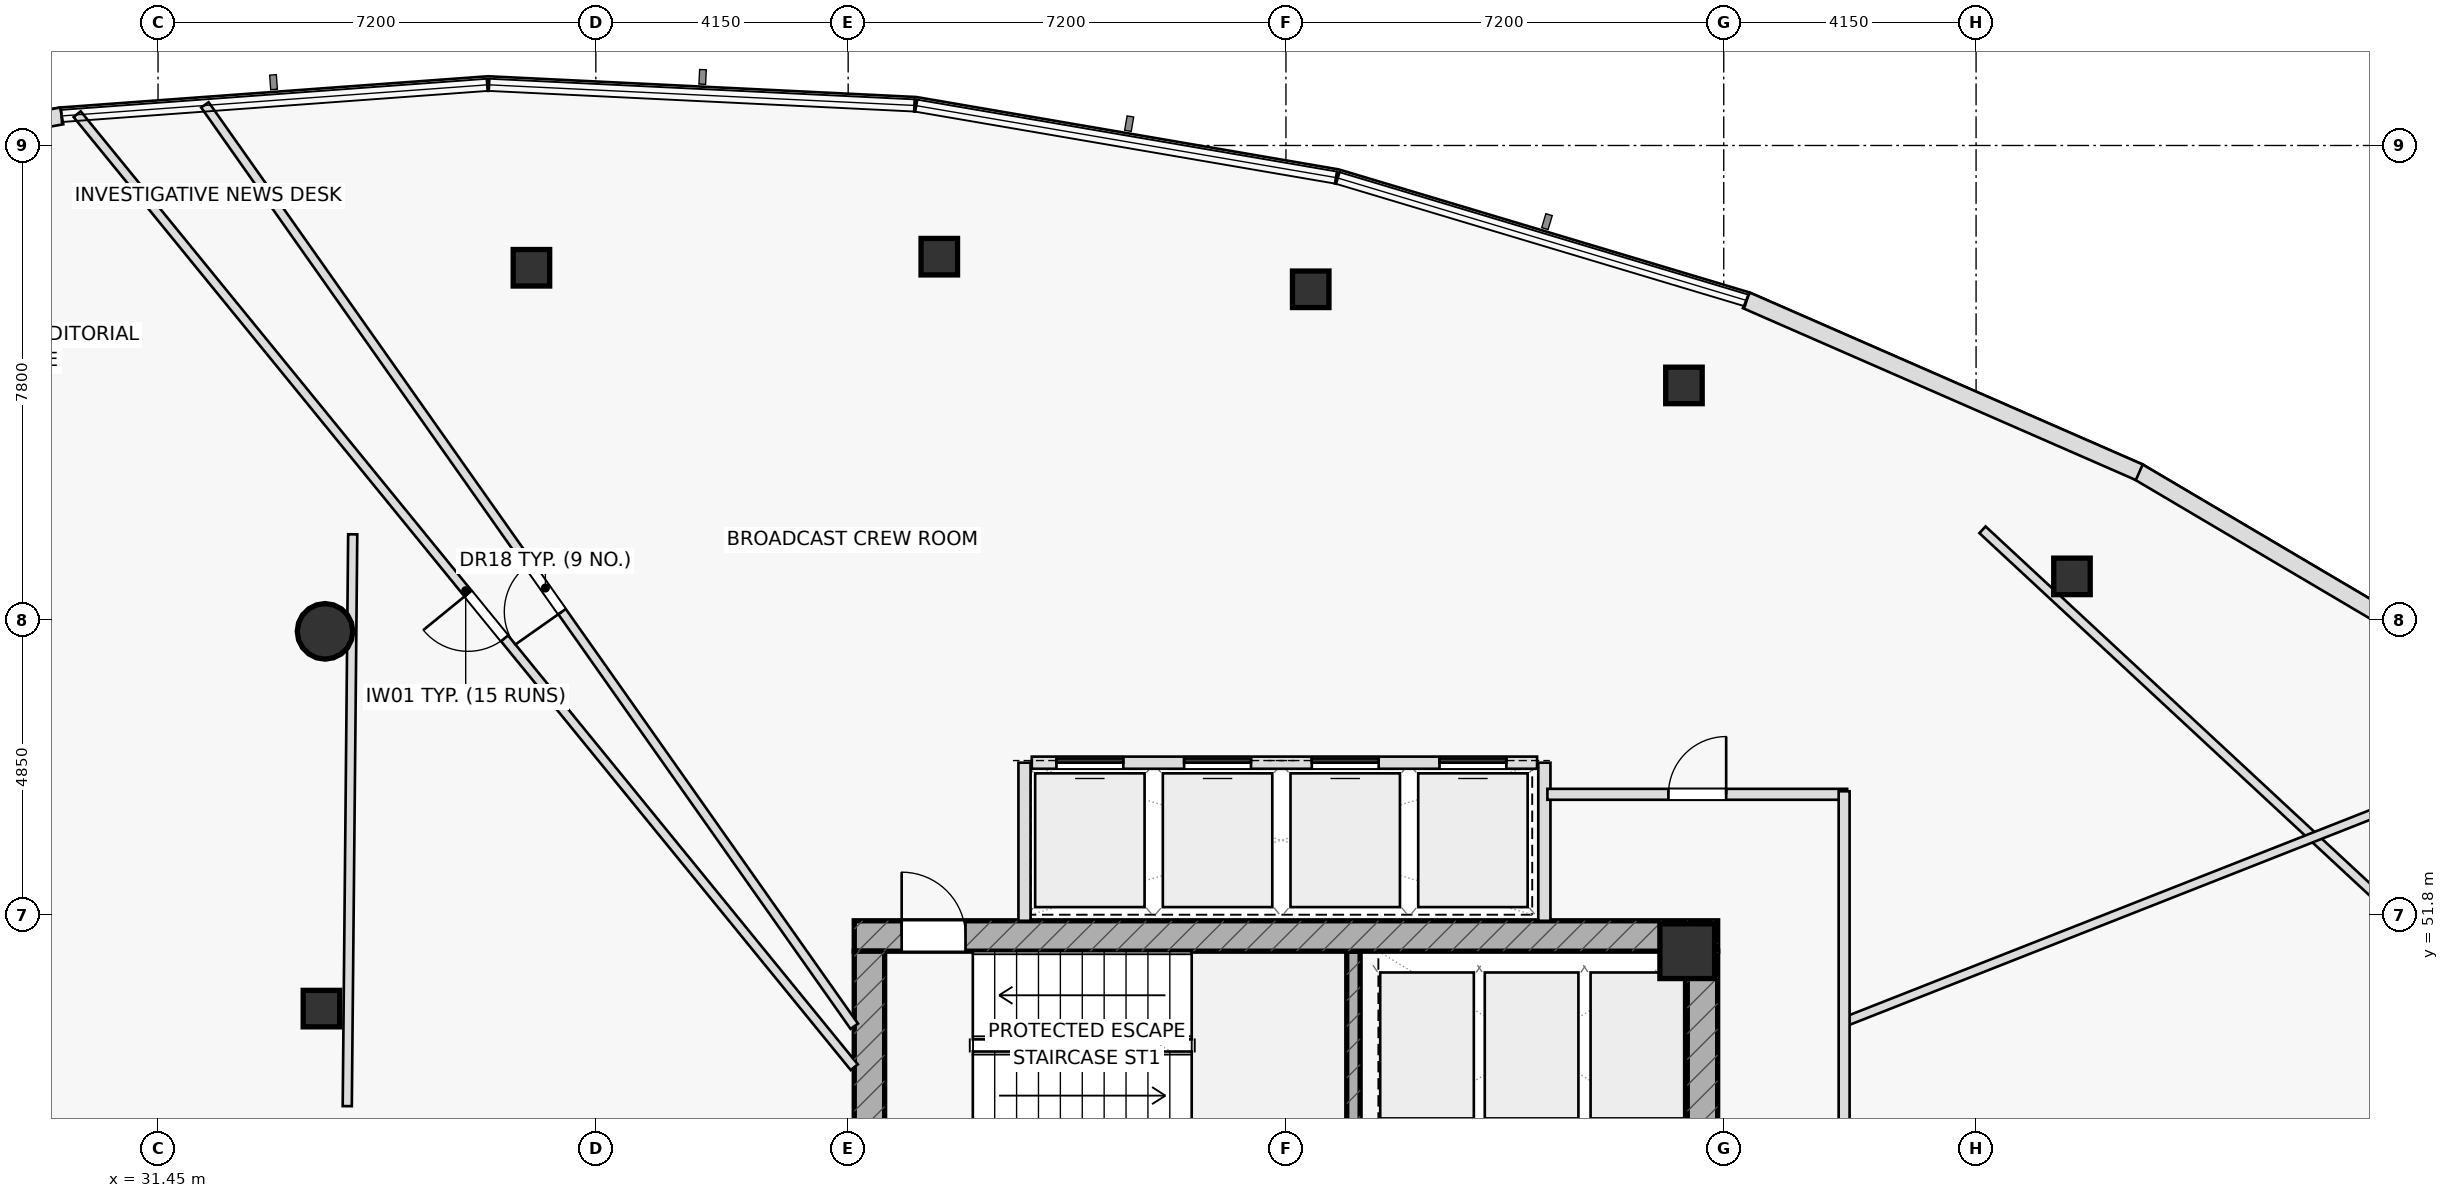
"""IFC4 building model, lengths in metres.
Left out: names, types, materials, properties, quantities, classifications, styles, units other than length and angle.
Written with IfcOpenShell. Run it as: python <this file> out.ifc"""

import sys

from ifc_helpers import new_model, si_unit, direction, frame, frame_2d, origin, origin_2d, place, context, subcontext, project, spatial, rectangle, hollow_rectangle, hollow_circle, extrude, element, fill, save


model = new_model("IFC4")
c1 = context("Model", 3, precision=1e-05, world=origin(), true_north=direction((0.0, 1.0)))
c2 = subcontext(c1, "Body", "Model", "MODEL_VIEW")
j1 = project(units=[si_unit("LENGTHUNIT", "METRE"), si_unit("PLANEANGLEUNIT", "RADIAN")], contexts=[c1])
p1 = place(None, origin())
s1 = spatial("IfcSite", under=j1, at=p1, CompositionType="ELEMENT")
p2 = place(p1, origin())
s2 = spatial("IfcBuilding", under=s1, at=p2, CompositionType="ELEMENT")
p3 = place(p2, frame((0.0, 0.0, 237.95)))
s3 = spatial("IfcBuildingStorey", under=s2, at=p3, CompositionType="ELEMENT", Elevation=237.95)
p4 = place(p3, frame((51.11, 48.1, 0.0), z_axis=(0.0, 0.0, 1.0), x_axis=(0.0, 1.0, 0.0)))
e1 = element("IfcWall", 1, at=p4, inside=s3, PredefinedType="SHEAR", context=c2, shape_type="SweptSolid", body=[
    extrude(rectangle(XDim=3.1, YDim=0.22, at=frame_2d((1.55, 0.0))), origin(), (0.0, 0.0, 1.0), 3.65),
])
p5 = place(p3, frame((42.9, 51.45, 0.0), z_axis=(0.0, 0.0, 1.0), x_axis=(1.0, 0.0, 0.0)))
e2 = element("IfcWall", 2, at=p5, inside=s3, PredefinedType="SHEAR", context=c2, shape_type="SweptSolid", body=[
    extrude(rectangle(XDim=14.2, YDim=0.5, at=frame_2d((7.1, 0.0))), origin(), (0.0, 0.0, 1.0), 3.65),
])
p6 = place(p5, frame((0.78, 0.0, 0.0)))
e3 = element("IfcOpeningElement", 3, at=p6, cuts=e2, PredefinedType="OPENING", context=c2, shape_type="SweptSolid", body=[
    extrude(rectangle(XDim=1.05, YDim=2.2, at=frame_2d((0.525, 1.1))), frame((0.0, 0.26, 0.0), z_axis=(0.0, -1.0, 0.0), x_axis=(1.0, 0.0, 0.0)), (0.0, 0.0, 1.0), 0.52),
])
p7 = place(p3, frame((43.15, 38.8, 0.0), z_axis=(0.0, 0.0, 1.0), x_axis=(0.0, 1.0, 0.0)))
e4 = element("IfcWall", 4, at=p7, inside=s3, PredefinedType="SHEAR", context=c2, shape_type="SweptSolid", body=[
    extrude(rectangle(XDim=12.4, YDim=0.5, at=frame_2d((6.2, 0.0))), origin(), (0.0, 0.0, 1.0), 3.65),
])
p8 = place(p3, frame((56.85, 38.8, 0.0), z_axis=(0.0, 0.0, 1.0), x_axis=(0.0, 1.0, 0.0)))
e5 = element("IfcWall", 5, at=p8, inside=s3, PredefinedType="SHEAR", context=c2, shape_type="SweptSolid", body=[
    extrude(rectangle(XDim=12.4, YDim=0.5, at=frame_2d((6.2, 0.0))), origin(), (0.0, 0.0, 1.0), 3.65),
])
p9 = place(p8, frame((3.85, 0.0, 0.0)))
e6 = element("IfcOpeningElement", 6, at=p9, cuts=e5, PredefinedType="OPENING", context=c2, shape_type="SweptSolid", body=[
    extrude(rectangle(XDim=1.5, YDim=2.2, at=frame_2d((0.75, 1.1))), frame((0.0, 0.26, 0.0), z_axis=(0.0, -1.0, 0.0), x_axis=(1.0, 0.0, 0.0)), (0.0, 0.0, 1.0), 0.52),
])
p10 = place(p3, frame((56.6, 51.2, 0.0), z_axis=(0.0, 0.0, 1.0), x_axis=(1.0, 0.0, 0.0)))
e7 = element("IfcColumn", 7, at=p10, inside=s3, PredefinedType="COLUMN", context=c2, shape_type="SweptSolid", body=[
    extrude(rectangle(XDim=0.9, YDim=0.9, at=origin_2d()), origin(), (0.0, 0.0, 1.0), 3.65),
])
p11 = place(p3, frame((34.196, 56.46, 0.0), z_axis=(0.0, 0.0, 1.0), x_axis=(1.0, 0.0, 0.0)))
e8 = element("IfcColumn", 8, at=p11, inside=s3, PredefinedType="COLUMN", context=c2, shape_type="SweptSolid", body=[
    extrude(hollow_circle(Radius=0.457, WallThickness=0.04, at=origin_2d()), origin(), (0.0, 0.0, 1.0), 3.65),
])
for number, where, z_axis, x_axis in (
    (9, (34.137, 50.256, 0.0), (0.0, 0.0, 1.0), (1.0, 0.0, 0.0)),
    (10, (62.927, 57.364, 0.0), (0.0, 0.0, 1.0), (1.0, 0.0, 0.0)),
    (11, (56.546, 60.504, 0.0), (0.0, 0.0, 1.0), (1.0, 0.0, 0.0)),
    (12, (50.407, 62.085, 0.0), (0.0, 0.0, 1.0), (1.0, 0.0, 0.0)),
    (13, (44.299, 62.621, 0.0), (0.0, 0.0, 1.0), (1.0, 0.0, 0.0)),
    (14, (37.591, 62.439, 0.0), (0.0, 0.0, 1.0), (1.0, 0.0, 0.0)),
):
    element("IfcColumn", number, at=place(p3, frame(where, z_axis=z_axis, x_axis=x_axis)), inside=s3, PredefinedType="COLUMN", context=c2, shape_type="SweptSolid", body=[
        extrude(hollow_rectangle(XDim=0.6, YDim=0.6, WallThickness=0.036, at=origin_2d()), origin(), (0.0, 0.0, 1.0), 3.65),
    ])
for number, where, z_axis, x_axis in (
    (15, (45.7, 51.7, 0.0), (0.0, 0.0, 1.0), (0.0, 1.0, 0.0)),
    (16, (54.25, 51.7, 0.0), (0.0, 0.0, 1.0), (0.0, 1.0, 0.0)),
):
    element("IfcWall", number, at=place(p3, frame(where, z_axis=z_axis, x_axis=x_axis)), inside=s3, PredefinedType="PARTITIONING", context=c2, shape_type="SweptSolid", body=[
        extrude(rectangle(XDim=2.6, YDim=0.2, at=frame_2d((1.3, 0.0))), origin(), (0.0, 0.0, 1.0), 3.65),
    ])
p12 = place(p3, frame((34.652, 58.056, 0.0), z_axis=(0.0, 0.0, 1.0), x_axis=(-0.009553538759, -0.999954363907, 0.0)))
e17 = element("IfcWall", 17, at=p12, inside=s3, PredefinedType="PARTITIONING", context=c2, shape_type="SweptSolid", body=[
    extrude(rectangle(XDim=9.404, YDim=0.15, at=frame_2d((4.702, 0.0))), origin(), (0.0, 0.0, 1.0), 3.135),
])
p13 = place(p3, frame((69.792, 50.388, 0.0), z_axis=(0.0, 0.0, 1.0), x_axis=(-0.732769799181, 0.680476613418, 0.0)))
e18 = element("IfcWall", 18, at=p13, inside=s3, PredefinedType="PARTITIONING", context=c2, shape_type="SweptSolid", body=[
    extrude(rectangle(XDim=11.378, YDim=0.15, at=frame_2d((5.689, 0.0))), origin(), (0.0, 0.0, 1.0), 3.025),
])
p14 = place(p3, frame((59.18, 50.034, 0.0), z_axis=(0.0, 0.0, 1.0), x_axis=(0.930421367736, 0.366491580339, 0.0)))
e19 = element("IfcWall", 19, at=p14, inside=s3, PredefinedType="PARTITIONING", context=c2, shape_type="SweptSolid", body=[
    extrude(rectangle(XDim=12.833, YDim=0.15, at=frame_2d((6.417, 0.0))), origin(), (0.0, 0.0, 1.0), 3.025),
])
p15 = place(p3, frame((42.9, 49.966, 0.0), z_axis=(0.0, 0.0, 1.0), x_axis=(-0.576086344137, 0.817388845103, 0.0)))
e20 = element("IfcWall", 20, at=p15, inside=s3, PredefinedType="PARTITIONING", context=c2, shape_type="SweptSolid", body=[
    extrude(rectangle(XDim=18.538, YDim=0.15, at=frame_2d((9.269, 0.0))), origin(), (0.0, 0.0, 1.0), 3.025),
])
p16 = place(p15, frame((8.342, 0.0, 0.0)))
e21 = element("IfcOpeningElement", 21, at=p16, cuts=e20, PredefinedType="OPENING", context=c2, shape_type="SweptSolid", body=[
    extrude(rectangle(XDim=0.95, YDim=2.05, at=frame_2d((0.475, 1.025))), frame((0.0, 0.085, 0.0), z_axis=(0.0, -1.0, 0.0), x_axis=(1.0, 0.0, 0.0)), (0.0, 0.0, 1.0), 0.17),
])
p17 = place(p3, frame((42.9, 49.292, 0.0), z_axis=(0.0, 0.0, 1.0), x_axis=(-0.631970108663, 0.77499276239, 0.0)))
e22 = element("IfcWall", 22, at=p17, inside=s3, PredefinedType="PARTITIONING", context=c2, shape_type="SweptSolid", body=[
    extrude(rectangle(XDim=20.223, YDim=0.15, at=frame_2d((10.111, 0.0))), origin(), (0.0, 0.0, 1.0), 3.025),
])
p18 = place(p17, frame((9.1, 0.0, 0.0)))
e23 = element("IfcOpeningElement", 23, at=p18, cuts=e22, PredefinedType="OPENING", context=c2, shape_type="SweptSolid", body=[
    extrude(rectangle(XDim=0.95, YDim=2.05, at=frame_2d((0.475, 1.025))), frame((0.0, 0.085, 0.0), z_axis=(0.0, -1.0, 0.0), x_axis=(1.0, 0.0, 0.0)), (0.0, 0.0, 1.0), 0.17),
])
p19 = place(p3, frame((54.3, 53.78, 0.0), z_axis=(0.0, 0.0, 1.0), x_axis=(1.0, 0.0, 0.0)))
e24 = element("IfcWall", 24, at=p19, inside=s3, PredefinedType="PARTITIONING", context=c2, shape_type="SweptSolid", body=[
    extrude(rectangle(XDim=4.93, YDim=0.18, at=frame_2d((2.465, 0.0))), origin(), (0.0, 0.0, 1.0), 3.65),
])
p20 = place(p19, frame((1.99, 0.0, 0.0)))
e25 = element("IfcOpeningElement", 25, at=p20, cuts=e24, PredefinedType="OPENING", context=c2, shape_type="SweptSolid", body=[
    extrude(rectangle(XDim=0.95, YDim=2.05, at=frame_2d((0.475, 1.025))), frame((0.0, 0.1, 0.0), z_axis=(0.0, -1.0, 0.0), x_axis=(1.0, 0.0, 0.0)), (0.0, 0.0, 1.0), 0.2),
])
p21 = place(p3, frame((59.18, 53.83, 0.0), z_axis=(0.0, 0.0, 1.0), x_axis=(0.0, -1.0, 0.0)))
e26 = element("IfcWall", 26, at=p21, inside=s3, PredefinedType="PARTITIONING", context=c2, shape_type="SweptSolid", body=[
    extrude(rectangle(XDim=5.53, YDim=0.18, at=frame_2d((2.765, 0.0))), origin(), (0.0, 0.0, 1.0), 3.65),
])
p22 = place(p3, frame((29.866, 64.937, 0.0), z_axis=(0.0, 0.0, 1.0), x_axis=(-0.983739710088, -0.17960006346, 0.0)))
e27 = element("IfcWall", 27, at=p22, inside=s3, PredefinedType="STANDARD", context=c2, shape_type="SweptSolid", body=[
    extrude(rectangle(XDim=1.834, YDim=0.28, at=frame_2d((0.917, 0.0))), origin(), (0.0, 0.0, 1.0), 3.65),
])
p23 = place(p3, frame((70.09, 55.496, 0.0), z_axis=(0.0, 0.0, 1.0), x_axis=(-0.860964362872, 0.508665278807, 0.0)))
e28 = element("IfcWall", 28, at=p23, inside=s3, PredefinedType="STANDARD", context=c2, shape_type="SweptSolid", body=[
    extrude(rectangle(XDim=7.065, YDim=0.28, at=frame_2d((3.532, 0.0))), origin(), (0.0, 0.0, 1.0), 3.65),
])
p24 = place(p3, frame((64.034, 59.076, 0.0), z_axis=(0.0, 0.0, 1.0), x_axis=(-0.916179577636, 0.400767989643, 0.0)))
e29 = element("IfcWall", 29, at=p24, inside=s3, PredefinedType="STANDARD", context=c2, shape_type="SweptSolid", body=[
    extrude(rectangle(XDim=7.053, YDim=0.28, at=frame_2d((3.527, 0.0))), origin(), (0.0, 0.0, 1.0), 3.65),
])
p25 = place(p3, frame((45.82, 54.3, 0.0), z_axis=(0.0, 0.0, 1.0), x_axis=(1.0, 0.0, 0.0)))
e30 = element("IfcWall", 30, at=p25, inside=s3, PredefinedType="PARTITIONING", context=c2, shape_type="SweptSolid", body=[
    extrude(rectangle(XDim=8.31, YDim=0.2, at=frame_2d((4.155, 0.0))), origin(), (0.0, 0.0, 1.0), 3.65),
])
p26 = place(p25, frame((0.405, 0.0, 0.0)))
e31 = element("IfcOpeningElement", 31, at=p26, cuts=e30, PredefinedType="OPENING", context=c2, shape_type="SweptSolid", body=[
    extrude(rectangle(XDim=1.1, YDim=2.15, at=frame_2d((0.55, 1.075))), frame((0.0, 0.11, 0.0), z_axis=(0.0, -1.0, 0.0), x_axis=(1.0, 0.0, 0.0)), (0.0, 0.0, 1.0), 0.22),
])
p27 = place(p25, frame((2.505, 0.0, 0.0)))
e32 = element("IfcOpeningElement", 32, at=p27, cuts=e30, PredefinedType="OPENING", context=c2, shape_type="SweptSolid", body=[
    extrude(rectangle(XDim=1.1, YDim=2.15, at=frame_2d((0.55, 1.075))), frame((0.0, 0.11, 0.0), z_axis=(0.0, -1.0, 0.0), x_axis=(1.0, 0.0, 0.0)), (0.0, 0.0, 1.0), 0.22),
])
p28 = place(p25, frame((4.605, 0.0, 0.0)))
e33 = element("IfcOpeningElement", 33, at=p28, cuts=e30, PredefinedType="OPENING", context=c2, shape_type="SweptSolid", body=[
    extrude(rectangle(XDim=1.1, YDim=2.15, at=frame_2d((0.55, 1.075))), frame((0.0, 0.11, 0.0), z_axis=(0.0, -1.0, 0.0), x_axis=(1.0, 0.0, 0.0)), (0.0, 0.0, 1.0), 0.22),
])
p29 = place(p25, frame((6.705, 0.0, 0.0)))
e34 = element("IfcOpeningElement", 34, at=p29, cuts=e30, PredefinedType="OPENING", context=c2, shape_type="SweptSolid", body=[
    extrude(rectangle(XDim=1.1, YDim=2.15, at=frame_2d((0.55, 1.075))), frame((0.0, 0.11, 0.0), z_axis=(0.0, -1.0, 0.0), x_axis=(1.0, 0.0, 0.0)), (0.0, 0.0, 1.0), 0.22),
])
p30 = place(p6, origin())
e35 = element("IfcDoor", 35, at=p30, inside=s3, OperationType="SINGLE_SWING_LEFT", PredefinedType="DOOR", context=c2, shape_type="SweptSolid", body=[
    extrude(rectangle(XDim=1.05, YDim=2.2, at=frame_2d((0.525, 1.1))), frame((0.0, 0.025, 0.0), z_axis=(0.0, -1.0, 0.0), x_axis=(1.0, 0.0, 0.0)), (0.0, 0.0, 1.0), 0.05),
])
fill(e3, e35)
p31 = place(p16, origin())
e36 = element("IfcDoor", 36, at=p31, inside=s3, OperationType="SINGLE_SWING_LEFT", PredefinedType="DOOR", context=c2, shape_type="SweptSolid", body=[
    extrude(rectangle(XDim=0.95, YDim=2.05, at=frame_2d((0.475, 1.025))), frame((0.0, 0.025, 0.0), z_axis=(0.0, -1.0, 0.0), x_axis=(1.0, 0.0, 0.0)), (0.0, 0.0, 1.0), 0.05),
])
fill(e21, e36)
p32 = place(p18, origin())
e37 = element("IfcDoor", 37, at=p32, inside=s3, OperationType="SINGLE_SWING_RIGHT", PredefinedType="DOOR", context=c2, shape_type="SweptSolid", body=[
    extrude(rectangle(XDim=0.95, YDim=2.05, at=frame_2d((0.475, 1.025))), frame((0.0, 0.025, 0.0), z_axis=(0.0, -1.0, 0.0), x_axis=(1.0, 0.0, 0.0)), (0.0, 0.0, 1.0), 0.05),
])
fill(e23, e37)
p33 = place(p20, origin())
e38 = element("IfcDoor", 38, at=p33, inside=s3, OperationType="SINGLE_SWING_RIGHT", PredefinedType="DOOR", context=c2, shape_type="SweptSolid", body=[
    extrude(rectangle(XDim=0.95, YDim=2.05, at=frame_2d((0.475, 1.025))), frame((0.0, 0.025, 0.0), z_axis=(0.0, -1.0, 0.0), x_axis=(1.0, 0.0, 0.0)), (0.0, 0.0, 1.0), 0.05),
])
fill(e25, e38)
p34 = place(p26, origin())
e39 = element("IfcDoor", 39, at=p34, inside=s3, OperationType="SLIDING_TO_LEFT", PredefinedType="DOOR", context=c2, shape_type="SweptSolid", body=[
    extrude(rectangle(XDim=1.1, YDim=2.15, at=frame_2d((0.55, 1.075))), frame((0.0, 0.025, 0.0), z_axis=(0.0, -1.0, 0.0), x_axis=(1.0, 0.0, 0.0)), (0.0, 0.0, 1.0), 0.05),
])
fill(e31, e39)
p35 = place(p27, origin())
e40 = element("IfcDoor", 40, at=p35, inside=s3, OperationType="SLIDING_TO_RIGHT", PredefinedType="DOOR", context=c2, shape_type="SweptSolid", body=[
    extrude(rectangle(XDim=1.1, YDim=2.15, at=frame_2d((0.55, 1.075))), frame((0.0, 0.025, 0.0), z_axis=(0.0, -1.0, 0.0), x_axis=(1.0, 0.0, 0.0)), (0.0, 0.0, 1.0), 0.05),
])
fill(e32, e40)
p36 = place(p28, origin())
e41 = element("IfcDoor", 41, at=p36, inside=s3, OperationType="SLIDING_TO_LEFT", PredefinedType="DOOR", context=c2, shape_type="SweptSolid", body=[
    extrude(rectangle(XDim=1.1, YDim=2.15, at=frame_2d((0.55, 1.075))), frame((0.0, 0.025, 0.0), z_axis=(0.0, -1.0, 0.0), x_axis=(1.0, 0.0, 0.0)), (0.0, 0.0, 1.0), 0.05),
])
fill(e33, e41)
p37 = place(p29, origin())
e42 = element("IfcDoor", 42, at=p37, inside=s3, OperationType="SLIDING_TO_RIGHT", PredefinedType="DOOR", context=c2, shape_type="SweptSolid", body=[
    extrude(rectangle(XDim=1.1, YDim=2.15, at=frame_2d((0.55, 1.075))), frame((0.0, 0.025, 0.0), z_axis=(0.0, -1.0, 0.0), x_axis=(1.0, 0.0, 0.0)), (0.0, 0.0, 1.0), 0.05),
])
fill(e34, e42)
save(model, sys.argv[1])
